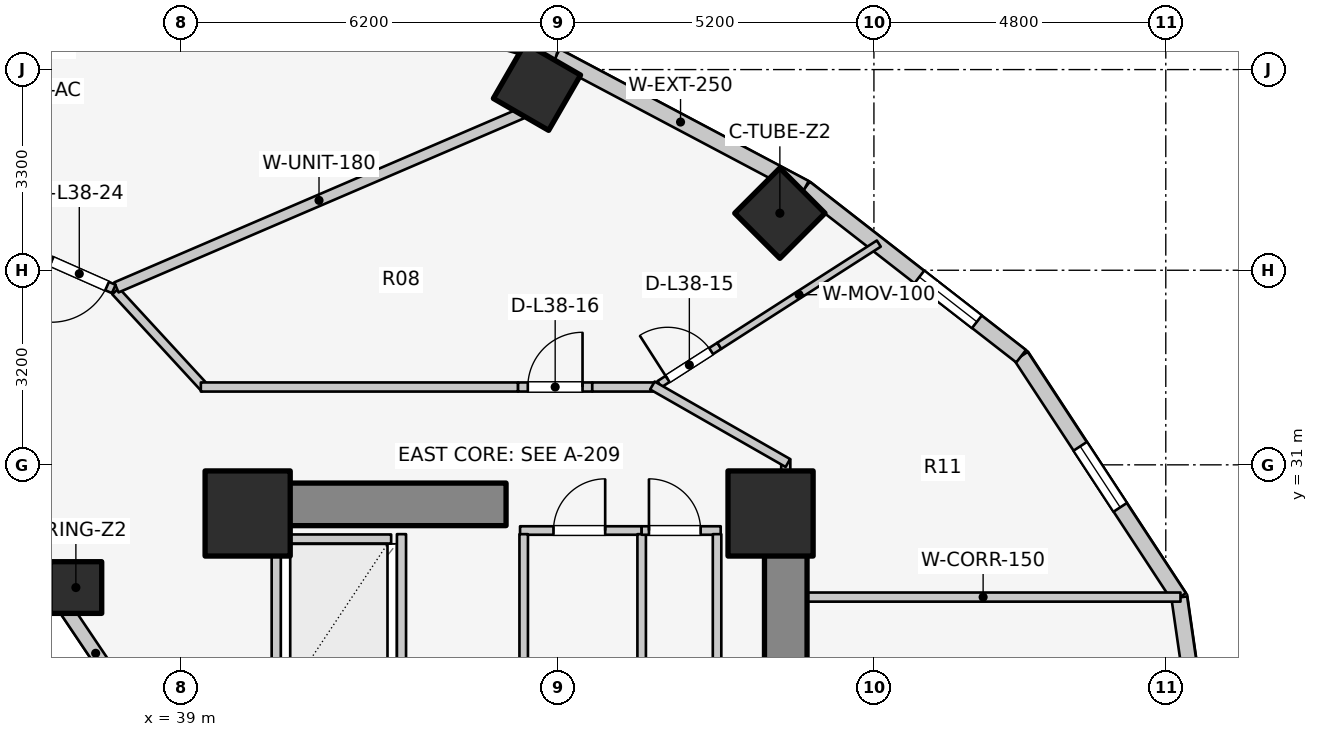
"""IFC4 building model, lengths in metres.
Left out: names, types, materials, properties, quantities, classifications, styles, units other than length and angle.
Written with IfcOpenShell. Run it as: python <this file> out.ifc"""

import sys

from ifc_helpers import new_model, si_unit, direction, frame, frame_2d, origin, origin_2d, place, context, subcontext, project, spatial, rectangle, extrude, element, fill, save


model = new_model("IFC4")
c1 = context("Model", 3, precision=1e-05, world=origin(), true_north=direction((0.0, 1.0)))
c2 = subcontext(c1, "Body", "Model", "MODEL_VIEW")
j1 = project(units=[si_unit("LENGTHUNIT", "METRE"), si_unit("PLANEANGLEUNIT", "RADIAN")], contexts=[c1])
p1 = place(None, origin())
s1 = spatial("IfcSite", under=j1, at=p1, CompositionType="ELEMENT")
p2 = place(p1, origin())
s2 = spatial("IfcBuilding", under=s1, at=p2, CompositionType="ELEMENT")
p3 = place(p2, frame((0.0, 0.0, 125.9)))
s3 = spatial("IfcBuildingStorey", under=s2, at=p3, CompositionType="ELEMENT", Elevation=125.9)
p4 = place(p3, frame((48.95, 17.05, 0.0), z_axis=(0.0, 0.0, 1.0), x_axis=(0.0, 1.0, 0.0)))
e1 = element("IfcWall", 1, at=p4, inside=s3, PredefinedType="SHEAR", context=c2, shape_type="SweptSolid", body=[
    extrude(rectangle(XDim=12.8, YDim=0.7, at=frame_2d((6.4, 0.0))), origin(), (0.0, 0.0, 1.0), 3.1),
])
p5 = place(p3, frame((39.85, 30.35, 0.0), z_axis=(0.0, 0.0, 1.0), x_axis=(1.0, 0.0, 0.0)))
e2 = element("IfcWall", 2, at=p5, inside=s3, PredefinedType="SHEAR", context=c2, shape_type="SweptSolid", body=[
    extrude(rectangle(XDim=4.5, YDim=0.7, at=frame_2d((2.25, 0.0))), origin(), (0.0, 0.0, 1.0), 3.1),
])
for number, where, z_axis, x_axis in (
    (3, (48.7, 30.2, 0.0), (0.0, 0.0, 1.0), (1.0, 0.0, 0.0)),
    (4, (40.1, 30.2, 0.0), (0.0, 0.0, 1.0), (1.0, 0.0, 0.0)),
):
    element("IfcColumn", number, at=place(p3, frame(where, z_axis=z_axis, x_axis=x_axis)), inside=s3, PredefinedType="COLUMN", context=c2, shape_type="SweptSolid", body=[
        extrude(rectangle(XDim=1.4, YDim=1.4, at=origin_2d()), origin(), (0.0, 0.0, 1.0), 3.1),
    ])
p6 = place(p3, frame((37.275, 28.982, 0.0), z_axis=(0.0, 0.0, 1.0), x_axis=(1.0, 0.0, 0.0)))
e5 = element("IfcColumn", 5, at=p6, inside=s3, PredefinedType="COLUMN", context=c2, shape_type="SweptSolid", body=[
    extrude(rectangle(XDim=0.85, YDim=0.85, at=origin_2d()), origin(), (0.0, 0.0, 1.0), 3.1),
])
for number, where, z_axis, x_axis in (
    (6, (48.853, 35.138, 0.0), (0.0, 0.0, 1.0), (0.707, 0.707, 0.0)),
    (7, (44.858, 37.218, 0.0), (0.0, 0.0, 1.0), (0.5, 0.866, 0.0)),
):
    element("IfcColumn", number, at=place(p3, frame(where, z_axis=z_axis, x_axis=x_axis)), inside=s3, PredefinedType="COLUMN", context=c2, shape_type="SweptSolid", body=[
        extrude(rectangle(XDim=1.05, YDim=1.05, at=origin_2d()), origin(), (0.0, 0.0, 1.0), 3.1),
    ])
p7 = place(p3, frame((38.166, 27.06, 0.0), z_axis=(0.0, 0.0, 1.0), x_axis=(-0.558197800898, 0.829707909492, 0.0)))
e8 = element("IfcWall", 8, at=p7, inside=s3, PredefinedType="STANDARD", context=c2, shape_type="SweptSolid", body=[
    extrude(rectangle(XDim=2.027, YDim=0.23, at=frame_2d((1.013, 0.0))), origin(), (0.0, 0.0, 1.0), 1.22),
])
p8 = place(p3, frame((37.035, 28.742, 0.0), z_axis=(0.0, 0.0, 1.0), x_axis=(-0.752576694707, 0.658504607869, 0.0)))
e9 = element("IfcWall", 9, at=p8, inside=s3, PredefinedType="STANDARD", context=c2, shape_type="SweptSolid", body=[
    extrude(rectangle(XDim=1.959, YDim=0.23, at=frame_2d((0.98, 0.0))), origin(), (0.0, 0.0, 1.0), 1.22),
])
p9 = place(p3, frame((56.26, 23.0, 0.0), z_axis=(0.0, 0.0, 1.0), x_axis=(-0.142572472068, 0.98978436551, 0.0)))
e10 = element("IfcWall", 10, at=p9, inside=s3, PredefinedType="STANDARD", context=c2, shape_type="SweptSolid", body=[
    extrude(rectangle(XDim=5.879, YDim=0.26, at=frame_2d((2.939, 0.0))), origin(), (0.0, 0.0, 1.0), 2.57),
])
p10 = place(p9, frame((3.426, 0.0, 0.75)))
e11 = element("IfcOpeningElement", 11, at=p10, cuts=e10, PredefinedType="OPENING", context=c2, shape_type="SweptSolid", body=[
    extrude(rectangle(XDim=1.2, YDim=1.5, at=frame_2d((0.6, 0.75))), frame((0.0, 0.14, 0.0), z_axis=(0.0, -1.0, 0.0), x_axis=(1.0, 0.0, 0.0)), (0.0, 0.0, 1.0), 0.28),
])
p11 = place(p3, frame((55.422, 28.819, 0.0), z_axis=(0.0, 0.0, 1.0), x_axis=(-0.548283220945, 0.836292717672, 0.0)))
e12 = element("IfcWall", 12, at=p11, inside=s3, PredefinedType="STANDARD", context=c2, shape_type="SweptSolid", body=[
    extrude(rectangle(XDim=4.744, YDim=0.26, at=frame_2d((2.372, 0.0))), origin(), (0.0, 0.0, 1.0), 1.22),
])
p12 = place(p11, frame((1.772, 0.0, 0.15)))
e13 = element("IfcOpeningElement", 13, at=p12, cuts=e12, PredefinedType="OPENING", context=c2, shape_type="SweptSolid", body=[
    extrude(rectangle(XDim=1.2, YDim=0.9, at=frame_2d((0.6, 0.45))), frame((0.0, 0.14, 0.0), z_axis=(0.0, -1.0, 0.0), x_axis=(1.0, 0.0, 0.0)), (0.0, 0.0, 1.0), 0.28),
])
p13 = place(p3, frame((52.821, 32.786, 0.0), z_axis=(0.0, 0.0, 1.0), x_axis=(-0.789127449954, 0.614229491094, 0.0)))
e14 = element("IfcWall", 14, at=p13, inside=s3, PredefinedType="STANDARD", context=c2, shape_type="SweptSolid", body=[
    extrude(rectangle(XDim=4.505, YDim=0.26, at=frame_2d((2.252, 0.0))), origin(), (0.0, 0.0, 1.0), 1.22),
])
p14 = place(p13, frame((0.922, 0.0, 0.15)))
e15 = element("IfcOpeningElement", 15, at=p14, cuts=e14, PredefinedType="OPENING", context=c2, shape_type="SweptSolid", body=[
    extrude(rectangle(XDim=1.2, YDim=0.9, at=frame_2d((0.6, 0.45))), frame((0.0, 0.14, 0.0), z_axis=(0.0, -1.0, 0.0), x_axis=(1.0, 0.0, 0.0)), (0.0, 0.0, 1.0), 0.28),
])
p15 = place(p3, frame((49.266, 35.553, 0.0), z_axis=(0.0, 0.0, 1.0), x_axis=(-0.883668636807, 0.4681129568, 0.0)))
e16 = element("IfcWall", 16, at=p15, inside=s3, PredefinedType="STANDARD", context=c2, shape_type="SweptSolid", body=[
    extrude(rectangle(XDim=4.631, YDim=0.26, at=frame_2d((2.316, 0.0))), origin(), (0.0, 0.0, 1.0), 1.22),
])
p16 = place(p3, frame((45.173, 37.721, 0.0), z_axis=(0.0, 0.0, 1.0), x_axis=(-0.962938491413, 0.269721081407, 0.0)))
e17 = element("IfcWall", 17, at=p16, inside=s3, PredefinedType="STANDARD", context=c2, shape_type="SweptSolid", body=[
    extrude(rectangle(XDim=5.563, YDim=0.26, at=frame_2d((2.782, 0.0))), origin(), (0.0, 0.0, 1.0), 1.22),
])
p17 = place(p16, frame((2.182, 0.0, 0.15)))
e18 = element("IfcOpeningElement", 18, at=p17, cuts=e17, PredefinedType="OPENING", context=c2, shape_type="SweptSolid", body=[
    extrude(rectangle(XDim=1.2, YDim=0.9, at=frame_2d((0.6, 0.45))), frame((0.0, 0.14, 0.0), z_axis=(0.0, -1.0, 0.0), x_axis=(1.0, 0.0, 0.0)), (0.0, 0.0, 1.0), 0.28),
])
p18 = place(p3, frame((40.74, 29.78, 0.0), z_axis=(0.0, 0.0, 1.0), x_axis=(1.0, 0.0, 0.0)))
e19 = element("IfcWall", 19, at=p18, inside=s3, PredefinedType="SOLIDWALL", context=c2, shape_type="SweptSolid", body=[
    extrude(rectangle(XDim=1.72, YDim=0.15, at=frame_2d((0.86, 0.0))), origin(), (0.0, 0.0, 1.0), 2.575),
])
for number, where, z_axis, x_axis in (
    (20, (40.57, 27.14, 0.0), (0.0, 0.0, 1.0), (0.0, 1.0, 0.0)),
    (21, (42.63, 27.14, 0.0), (0.0, 0.0, 1.0), (0.0, 1.0, 0.0)),
):
    element("IfcWall", number, at=place(p3, frame(where, z_axis=z_axis, x_axis=x_axis)), inside=s3, PredefinedType="SOLIDWALL", context=c2, shape_type="SweptSolid", body=[
        extrude(rectangle(XDim=2.72, YDim=0.15, at=frame_2d((1.36, 0.0))), origin(), (0.0, 0.0, 1.0), 2.575),
    ])
p19 = place(p3, frame((44.58, 29.92, 0.0), z_axis=(0.0, 0.0, 1.0), x_axis=(1.0, 0.0, 0.0)))
e22 = element("IfcWall", 22, at=p19, inside=s3, PredefinedType="PLUMBINGWALL", context=c2, shape_type="SweptSolid", body=[
    extrude(rectangle(XDim=2.0, YDim=0.14, at=frame_2d((1.0, 0.0))), origin(), (0.0, 0.0, 1.0), 2.575),
])
p20 = place(p19, frame((0.55, 0.0, 0.0)))
e23 = element("IfcOpeningElement", 23, at=p20, cuts=e22, PredefinedType="OPENING", context=c2, shape_type="SweptSolid", body=[
    extrude(rectangle(XDim=0.85, YDim=2.05, at=frame_2d((0.425, 1.025))), frame((0.0, 0.08, 0.0), z_axis=(0.0, -1.0, 0.0), x_axis=(1.0, 0.0, 0.0)), (0.0, 0.0, 1.0), 0.16),
])
for number, where, z_axis, x_axis in (
    (24, (44.64, 25.98, 0.0), (0.0, 0.0, 1.0), (0.0, 1.0, 0.0)),
    (25, (46.58, 25.98, 0.0), (0.0, 0.0, 1.0), (0.0, 1.0, 0.0)),
):
    element("IfcWall", number, at=place(p3, frame(where, z_axis=z_axis, x_axis=x_axis)), inside=s3, PredefinedType="PLUMBINGWALL", context=c2, shape_type="SweptSolid", body=[
        extrude(rectangle(XDim=3.88, YDim=0.14, at=frame_2d((1.94, 0.0))), origin(), (0.0, 0.0, 1.0), 2.575),
    ])
p21 = place(p3, frame((46.58, 29.92, 0.0), z_axis=(0.0, 0.0, 1.0), x_axis=(1.0, 0.0, 0.0)))
e26 = element("IfcWall", 26, at=p21, inside=s3, PredefinedType="PLUMBINGWALL", context=c2, shape_type="SweptSolid", body=[
    extrude(rectangle(XDim=1.3, YDim=0.14, at=frame_2d((0.65, 0.0))), origin(), (0.0, 0.0, 1.0), 2.575),
])
p22 = place(p21, frame((0.12, 0.0, 0.0)))
e27 = element("IfcOpeningElement", 27, at=p22, cuts=e26, PredefinedType="OPENING", context=c2, shape_type="SweptSolid", body=[
    extrude(rectangle(XDim=0.85, YDim=2.05, at=frame_2d((0.425, 1.025))), frame((0.0, 0.08, 0.0), z_axis=(0.0, -1.0, 0.0), x_axis=(1.0, 0.0, 0.0)), (0.0, 0.0, 1.0), 0.16),
])
p23 = place(p3, frame((47.82, 25.98, 0.0), z_axis=(0.0, 0.0, 1.0), x_axis=(0.0, 1.0, 0.0)))
e28 = element("IfcWall", 28, at=p23, inside=s3, PredefinedType="PLUMBINGWALL", context=c2, shape_type="SweptSolid", body=[
    extrude(rectangle(XDim=3.88, YDim=0.14, at=frame_2d((1.94, 0.0))), origin(), (0.0, 0.0, 1.0), 2.575),
])
p24 = place(p3, frame((48.95, 28.825, 0.0), z_axis=(0.0, 0.0, 1.0), x_axis=(1.0, 0.0, 0.0)))
e29 = element("IfcWall", 29, at=p24, inside=s3, PredefinedType="PARTITIONING", context=c2, shape_type="SweptSolid", body=[
    extrude(rectangle(XDim=6.492, YDim=0.15, at=frame_2d((3.246, 0.0))), origin(), (0.0, 0.0, 1.0), 2.575),
])
p25 = place(p3, frame((48.95, 29.8, 0.0), z_axis=(0.0, 0.0, 1.0), x_axis=(0.0, 1.0, 0.0)))
e30 = element("IfcWall", 30, at=p25, inside=s3, PredefinedType="PARTITIONING", context=c2, shape_type="SweptSolid", body=[
    extrude(rectangle(XDim=1.29, YDim=0.15, at=frame_2d((0.645, 0.0))), origin(), (0.0, 0.0, 1.0), 1.22),
])
p26 = place(p3, frame((46.872, 32.326, 0.0), z_axis=(0.0, 0.0, 1.0), x_axis=(0.841774593721, 0.53982917054, 0.0)))
e31 = element("IfcWall", 31, at=p26, inside=s3, PredefinedType="MOVABLE", context=c2, shape_type="SweptSolid", body=[
    extrude(rectangle(XDim=1.17, YDim=0.12, at=frame_2d((0.585, 0.0))), origin(), (0.0, 0.0, 1.0), 2.11),
])
p27 = place(p26, frame((0.16, 0.0, 0.0)))
e32 = element("IfcOpeningElement", 32, at=p27, cuts=e31, PredefinedType="OPENING", context=c2, shape_type="SweptSolid", body=[
    extrude(rectangle(XDim=0.85, YDim=2.05, at=frame_2d((0.425, 1.025))), frame((0.0, 0.07, 0.0), z_axis=(0.0, -1.0, 0.0), x_axis=(1.0, 0.0, 0.0)), (0.0, 0.0, 1.0), 0.14),
])
p28 = place(p3, frame((47.857, 32.958, 0.0), z_axis=(0.0, 0.0, 1.0), x_axis=(0.841931160388, 0.539584952689, 0.0)))
e33 = element("IfcWall", 33, at=p28, inside=s3, PredefinedType="MOVABLE", context=c2, shape_type="SweptSolid", body=[
    extrude(rectangle(XDim=3.116, YDim=0.12, at=frame_2d((1.558, 0.0))), origin(), (0.0, 0.0, 1.0), 1.22),
])
p29 = place(p3, frame((37.928, 33.856, 0.0), z_axis=(0.0, 0.0, 1.0), x_axis=(0.677579737957, -0.735449317567, 0.0)))
e34 = element("IfcWall", 34, at=p29, inside=s3, PredefinedType="PARTITIONING", context=c2, shape_type="SweptSolid", body=[
    extrude(rectangle(XDim=2.173, YDim=0.15, at=frame_2d((1.086, 0.0))), origin(), (0.0, 0.0, 1.0), 1.22),
])
p30 = place(p3, frame((39.33, 32.28, 0.0), z_axis=(0.0, 0.0, 1.0), x_axis=(1.0, 0.0, 0.0)))
e35 = element("IfcWall", 35, at=p30, inside=s3, PredefinedType="PARTITIONING", context=c2, shape_type="SweptSolid", body=[
    extrude(rectangle(XDim=5.218, YDim=0.15, at=frame_2d((2.609, 0.0))), origin(), (0.0, 0.0, 1.0), 1.22),
])
p31 = place(p3, frame((44.548, 32.28, 0.0), z_axis=(0.0, 0.0, 1.0), x_axis=(1.0, 0.0, 0.0)))
e36 = element("IfcWall", 36, at=p31, inside=s3, PredefinedType="PARTITIONING", context=c2, shape_type="SweptSolid", body=[
    extrude(rectangle(XDim=1.22, YDim=0.15, at=frame_2d((0.61, 0.0))), origin(), (0.0, 0.0, 1.0), 2.16),
])
p32 = place(p31, frame((0.16, 0.0, 0.0)))
e37 = element("IfcOpeningElement", 37, at=p32, cuts=e36, PredefinedType="OPENING", context=c2, shape_type="SweptSolid", body=[
    extrude(rectangle(XDim=0.9, YDim=2.1, at=frame_2d((0.45, 1.05))), frame((0.0, 0.085, 0.0), z_axis=(0.0, -1.0, 0.0), x_axis=(1.0, 0.0, 0.0)), (0.0, 0.0, 1.0), 0.17),
])
p33 = place(p3, frame((45.768, 32.28, 0.0), z_axis=(0.0, 0.0, 1.0), x_axis=(1.0, 0.0, 0.0)))
e38 = element("IfcWall", 38, at=p33, inside=s3, PredefinedType="PARTITIONING", context=c2, shape_type="SweptSolid", body=[
    extrude(rectangle(XDim=1.083, YDim=0.15, at=frame_2d((0.541, 0.0))), origin(), (0.0, 0.0, 1.0), 2.575),
])
p34 = place(p3, frame((46.757, 32.305, 0.0), z_axis=(0.0, 0.0, 1.0), x_axis=(0.867991349648, -0.496579315857, 0.0)))
e39 = element("IfcWall", 39, at=p34, inside=s3, PredefinedType="PARTITIONING", context=c2, shape_type="SweptSolid", body=[
    extrude(rectangle(XDim=2.567, YDim=0.15, at=frame_2d((1.283, 0.0))), origin(), (0.0, 0.0, 1.0), 1.22),
])
p35 = place(p3, frame((37.941, 33.918, 0.0), z_axis=(0.0, 0.0, 1.0), x_axis=(0.918836579087, 0.394638240584, 0.0)))
e40 = element("IfcWall", 40, at=p35, inside=s3, PredefinedType="PARTITIONING", context=c2, shape_type="SweptSolid", body=[
    extrude(rectangle(XDim=7.253, YDim=0.18, at=frame_2d((3.626, 0.0))), origin(), (0.0, 0.0, 1.0), 1.22),
])
p36 = place(p3, frame((37.898, 33.892, 0.0), z_axis=(0.0, 0.0, 1.0), x_axis=(-0.914525839607, 0.404527488177, 0.0)))
e41 = element("IfcWall", 41, at=p36, inside=s3, PredefinedType="PARTITIONING", context=c2, shape_type="SweptSolid", body=[
    extrude(rectangle(XDim=1.28, YDim=0.15, at=frame_2d((0.64, 0.0))), origin(), (0.0, 0.0, 1.0), 2.16),
])
p37 = place(p36, frame((0.12, 0.0, 0.0)))
e42 = element("IfcOpeningElement", 42, at=p37, cuts=e41, PredefinedType="OPENING", context=c2, shape_type="SweptSolid", body=[
    extrude(rectangle(XDim=1.0, YDim=2.1, at=frame_2d((0.5, 1.05))), frame((0.0, 0.085, 0.0), z_axis=(0.0, -1.0, 0.0), x_axis=(1.0, 0.0, 0.0)), (0.0, 0.0, 1.0), 0.17),
])
p38 = place(p12, origin())
e43 = element("IfcWindow", 43, at=p38, inside=s3, PartitioningType="SINGLE_PANEL", PredefinedType="WINDOW", context=c2, shape_type="SweptSolid", body=[
    extrude(rectangle(XDim=1.2, YDim=0.9, at=frame_2d((0.6, 0.45))), frame((0.0, 0.03, 0.0), z_axis=(0.0, -1.0, 0.0), x_axis=(1.0, 0.0, 0.0)), (0.0, 0.0, 1.0), 0.06),
])
fill(e13, e43)
p39 = place(p14, origin())
e44 = element("IfcWindow", 44, at=p39, inside=s3, PartitioningType="SINGLE_PANEL", PredefinedType="WINDOW", context=c2, shape_type="SweptSolid", body=[
    extrude(rectangle(XDim=1.2, YDim=0.9, at=frame_2d((0.6, 0.45))), frame((0.0, 0.03, 0.0), z_axis=(0.0, -1.0, 0.0), x_axis=(1.0, 0.0, 0.0)), (0.0, 0.0, 1.0), 0.06),
])
fill(e15, e44)
p40 = place(p20, origin())
e45 = element("IfcDoor", 45, at=p40, inside=s3, OperationType="SINGLE_SWING_RIGHT", PredefinedType="DOOR", context=c2, shape_type="SweptSolid", body=[
    extrude(rectangle(XDim=0.85, YDim=2.05, at=frame_2d((0.425, 1.025))), frame((0.0, 0.025, 0.0), z_axis=(0.0, -1.0, 0.0), x_axis=(1.0, 0.0, 0.0)), (0.0, 0.0, 1.0), 0.05),
])
fill(e23, e45)
p41 = place(p22, origin())
e46 = element("IfcDoor", 46, at=p41, inside=s3, OperationType="SINGLE_SWING_LEFT", PredefinedType="DOOR", context=c2, shape_type="SweptSolid", body=[
    extrude(rectangle(XDim=0.85, YDim=2.05, at=frame_2d((0.425, 1.025))), frame((0.0, 0.025, 0.0), z_axis=(0.0, -1.0, 0.0), x_axis=(1.0, 0.0, 0.0)), (0.0, 0.0, 1.0), 0.05),
])
fill(e27, e46)
p42 = place(p27, origin())
e47 = element("IfcDoor", 47, at=p42, inside=s3, OperationType="SINGLE_SWING_LEFT", PredefinedType="DOOR", context=c2, shape_type="SweptSolid", body=[
    extrude(rectangle(XDim=0.85, YDim=2.05, at=frame_2d((0.425, 1.025))), frame((0.0, 0.025, 0.0), z_axis=(0.0, -1.0, 0.0), x_axis=(1.0, 0.0, 0.0)), (0.0, 0.0, 1.0), 0.05),
])
fill(e32, e47)
p43 = place(p32, origin())
e48 = element("IfcDoor", 48, at=p43, inside=s3, OperationType="SINGLE_SWING_RIGHT", PredefinedType="DOOR", context=c2, shape_type="SweptSolid", body=[
    extrude(rectangle(XDim=0.9, YDim=2.1, at=frame_2d((0.45, 1.05))), frame((0.0, 0.025, 0.0), z_axis=(0.0, -1.0, 0.0), x_axis=(1.0, 0.0, 0.0)), (0.0, 0.0, 1.0), 0.05),
])
fill(e37, e48)
p44 = place(p37, origin())
e49 = element("IfcDoor", 49, at=p44, inside=s3, OperationType="SINGLE_SWING_RIGHT", PredefinedType="DOOR", context=c2, shape_type="SweptSolid", body=[
    extrude(rectangle(XDim=1.0, YDim=2.1, at=frame_2d((0.5, 1.05))), frame((0.0, 0.025, 0.0), z_axis=(0.0, -1.0, 0.0), x_axis=(1.0, 0.0, 0.0)), (0.0, 0.0, 1.0), 0.05),
])
fill(e42, e49)
save(model, sys.argv[1])
